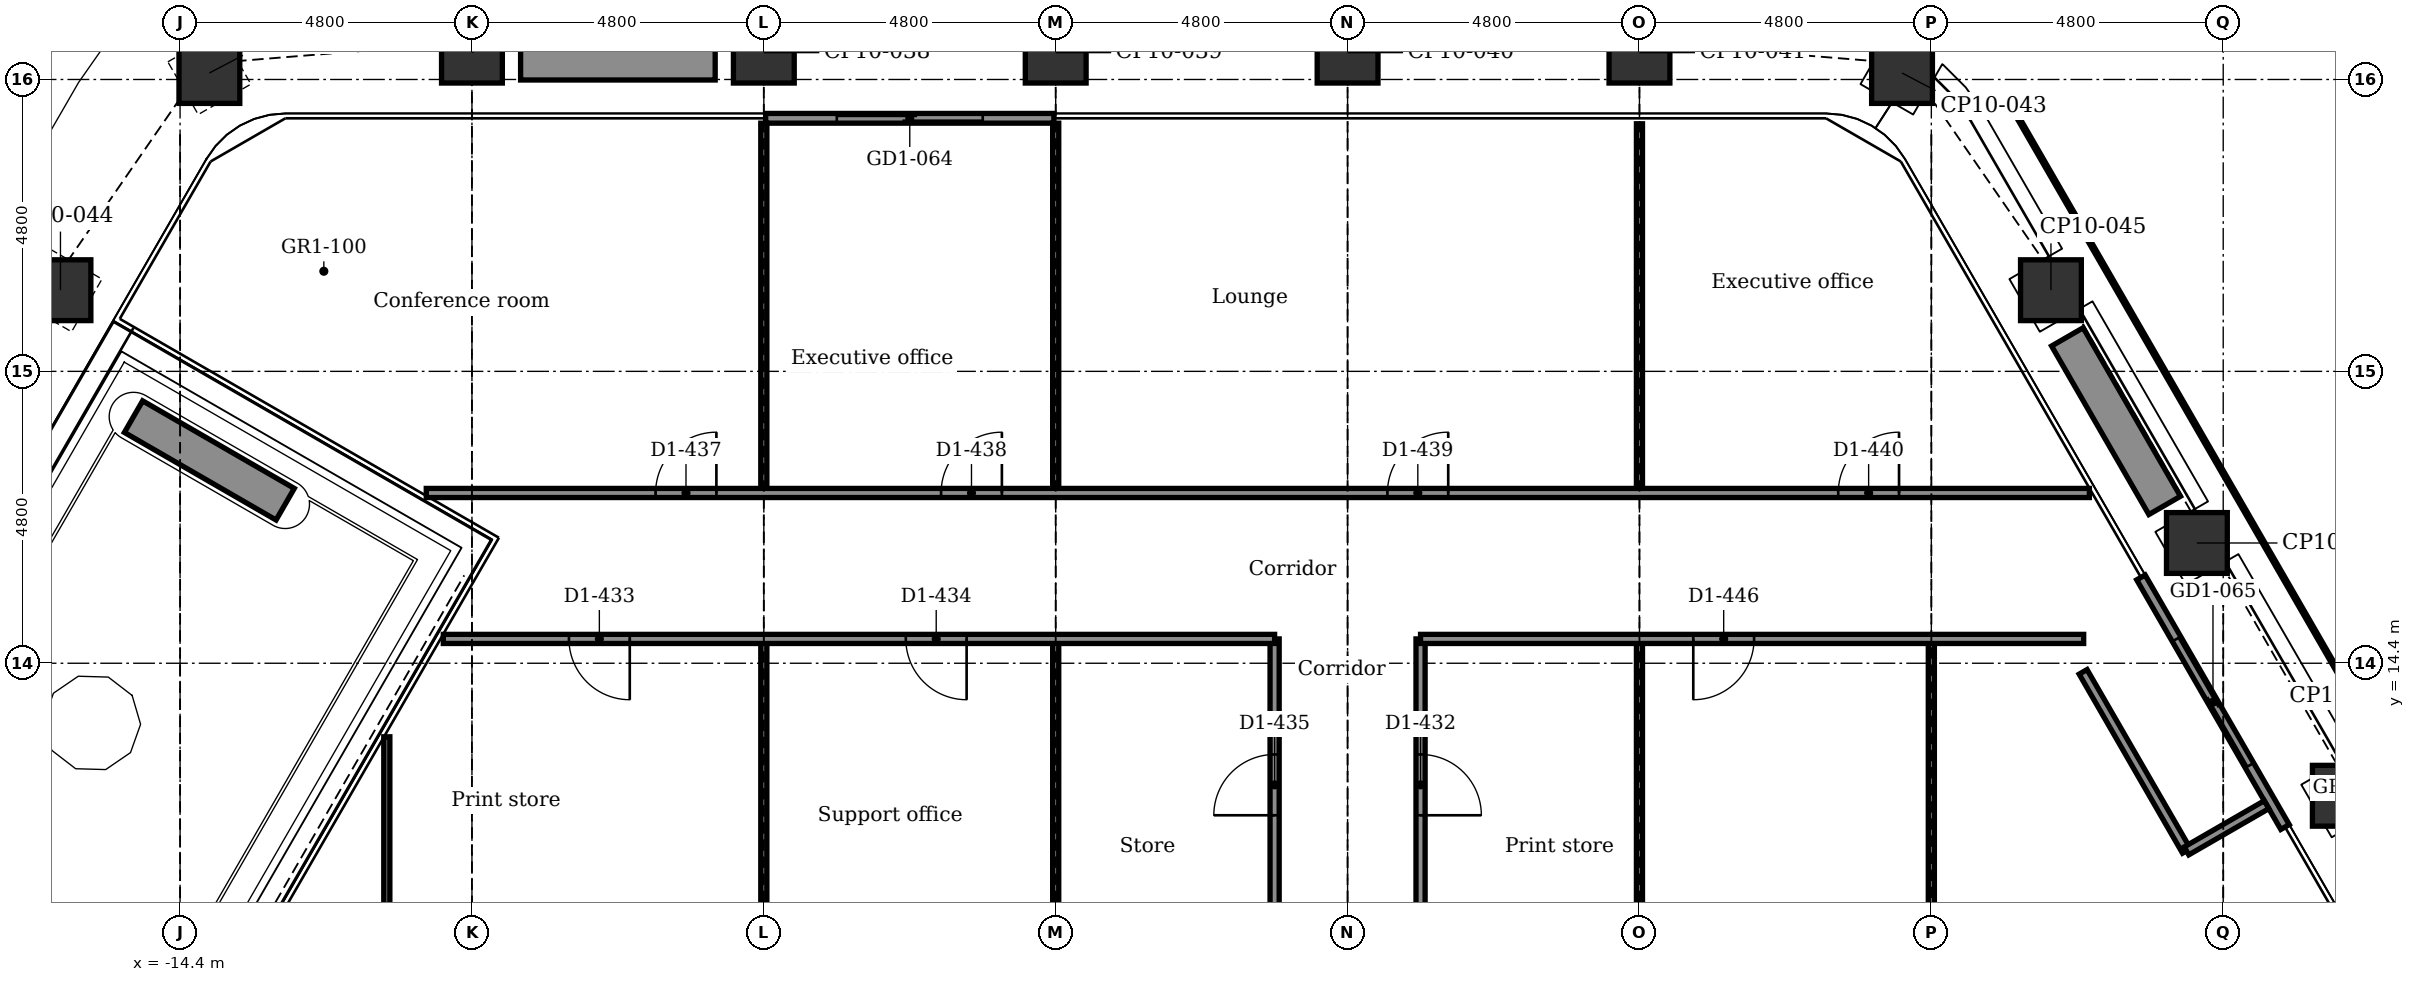
"""IFC4 building model, lengths in metres.
Left out: names, types, materials, properties, quantities, classifications, styles, units other than length and angle.
Written with IfcOpenShell. Run it as: python <this file> out.ifc"""

import sys

from ifc_helpers import new_model, si_unit, direction, frame, frame_2d, origin, origin_2d, place, context, subcontext, project, spatial, rectangle, extrude, element, fill, save


model = new_model("IFC4")
c1 = context("Model", 3, precision=1e-05, world=origin(), true_north=direction((0.0, 1.0)))
c2 = subcontext(c1, "Body", "Model", "MODEL_VIEW")
j1 = project(units=[si_unit("LENGTHUNIT", "METRE"), si_unit("PLANEANGLEUNIT", "RADIAN")], contexts=[c1])
p1 = place(None, origin())
s1 = spatial("IfcSite", under=j1, at=p1, CompositionType="ELEMENT")
p2 = place(p1, origin())
s2 = spatial("IfcBuilding", under=s1, at=p2, CompositionType="ELEMENT")
p3 = place(p2, frame((0.0, 0.0, 150.5)))
s3 = spatial("IfcBuildingStorey", under=s2, at=p3, CompositionType="ELEMENT", Elevation=150.5)
for number, where, z_axis, x_axis in (
    (1, (-13.918, 24.107, -0.15), (0.0, 0.0, 1.0), (0.866, 0.5, 0.0)),
    (2, (-9.6, 24.442, -0.15), (0.0, 0.0, 1.0), (1.0, 0.0, 0.0)),
    (3, (-4.8, 24.442, -0.15), (0.0, 0.0, 1.0), (1.0, 0.0, 0.0)),
    (4, (0.0, 24.442, -0.15), (0.0, 0.0, 1.0), (1.0, 0.0, 0.0)),
    (5, (4.8, 24.442, -0.15), (0.0, 0.0, 1.0), (1.0, 0.0, 0.0)),
    (6, (9.6, 24.442, -0.15), (0.0, 0.0, 1.0), (1.0, 0.0, 0.0)),
    (7, (13.918, 24.107, -0.15), (0.0, 0.0, 1.0), (0.5, 0.866, 0.0)),
    (8, (16.367, 20.535, -0.15), (0.0, 0.0, 1.0), (0.866, 0.5, 0.0)),
    (9, (18.767, 16.378, -0.15), (0.0, 0.0, 1.0), (0.866, 0.5, 0.0)),
    (10, (21.167, 12.221, -0.15), (0.0, 0.0, 1.0), (0.866, 0.5, 0.0)),
    (11, (-16.367, 20.535, -0.15), (0.0, 0.0, 1.0), (0.5, 0.866, 0.0)),
):
    element("IfcColumn", number, at=place(p3, frame(where, z_axis=z_axis, x_axis=x_axis)), inside=s3, PredefinedType="COLUMN", context=c2, shape_type="SweptSolid", body=[
        extrude(rectangle(XDim=1.0, YDim=1.0, at=origin_2d()), origin(), (0.0, 0.0, 1.0), 3.9),
    ])
p4 = place(p3, frame((-4.77, 23.362, 0.0), z_axis=(0.0, 0.0, 1.0), x_axis=(1.0, 0.0, 0.0)))
e12 = element("IfcWall", 12, at=p4, inside=s3, PredefinedType="PARTITIONING", context=c2, shape_type="SweptSolid", body=[
    extrude(rectangle(XDim=4.74, YDim=0.16, at=frame_2d((2.37, 0.0))), origin(), (0.0, 0.0, 1.0), 3.75),
])
p5 = place(p4, frame((1.17, 0.0, 0.0)))
e13 = element("IfcOpeningElement", 13, at=p5, cuts=e12, PredefinedType="OPENING", context=c2, shape_type="SweptSolid", body=[
    extrude(rectangle(XDim=2.4, YDim=2.4, at=frame_2d((1.2, 1.2))), frame((0.0, 0.09, 0.0), z_axis=(0.0, -1.0, 0.0), x_axis=(1.0, 0.0, 0.0)), (0.0, 0.0, 1.0), 0.18),
])
p6 = place(p3, frame((17.847, 15.812, 0.0), z_axis=(0.0, 0.0, 1.0), x_axis=(0.5000167099, -0.866015756104, 0.0)))
e14 = element("IfcWall", 14, at=p6, inside=s3, PredefinedType="PARTITIONING", context=c2, shape_type="SweptSolid", body=[
    extrude(rectangle(XDim=4.74, YDim=0.16, at=frame_2d((2.37, 0.0))), origin(), (0.0, 0.0, 1.0), 3.75),
])
p7 = place(p6, frame((1.17, 0.0, 0.0)))
e15 = element("IfcOpeningElement", 15, at=p7, cuts=e14, PredefinedType="OPENING", context=c2, shape_type="SweptSolid", body=[
    extrude(rectangle(XDim=2.4, YDim=2.4, at=frame_2d((1.2, 1.2))), frame((0.0, 0.09, 0.0), z_axis=(0.0, -1.0, 0.0), x_axis=(1.0, 0.0, 0.0)), (0.0, 0.0, 1.0), 0.18),
])
for number, where, z_axis, x_axis in (
    (16, (-8.8, 24.292, 0.0), (0.0, 0.0, 1.0), (1.0, 0.0, 0.0)),
    (17, (16.637, 19.767, 0.0), (0.0, 0.0, 1.0), (0.5, -0.866, 0.0)),
):
    element("IfcWall", number, at=place(p3, frame(where, z_axis=z_axis, x_axis=x_axis)), inside=s3, PredefinedType="USERDEFINED", context=c2, shape_type="SweptSolid", body=[
        extrude(rectangle(XDim=3.2, YDim=0.6, at=frame_2d((1.6, 0.0))), origin(), (0.0, 0.0, 1.0), 0.7),
    ])
p8 = place(p3, frame((-12.671, 17.015, 0.0), z_axis=(0.0, 0.0, 1.0), x_axis=(-0.866054314686, 0.499949921505, 0.0)))
e18 = element("IfcWall", 18, at=p8, inside=s3, PredefinedType="USERDEFINED", context=c2, shape_type="SweptSolid", body=[
    extrude(rectangle(XDim=2.88, YDim=0.6, at=frame_2d((1.44, 0.0))), origin(), (0.0, 0.0, 1.0), 0.7),
])
p9 = place(p3, frame((14.4, 9.694, 0.0), z_axis=(0.0, 0.0, 1.0), x_axis=(0.0, 1.0, 0.0)))
e19 = element("IfcWall", 19, at=p9, inside=s3, PredefinedType="PARTITIONING", context=c2, shape_type="SweptSolid", body=[
    extrude(rectangle(XDim=5.106, YDim=0.1, at=frame_2d((2.553, 0.0))), origin(), (0.0, 0.0, 1.0), 3.066),
])
p10 = place(p3, frame((9.6, 9.95, 0.0), z_axis=(0.0, 0.0, 1.0), x_axis=(0.0, 1.0, 0.0)))
e20 = element("IfcWall", 20, at=p10, inside=s3, PredefinedType="PARTITIONING", context=c2, shape_type="SweptSolid", body=[
    extrude(rectangle(XDim=4.85, YDim=0.1, at=frame_2d((2.425, 0.0))), origin(), (0.0, 0.0, 1.0), 3.066),
])
p11 = place(p3, frame((9.6, 17.2, 0.0), z_axis=(0.0, 0.0, 1.0), x_axis=(0.0, 1.0, 0.0)))
e21 = element("IfcWall", 21, at=p11, inside=s3, PredefinedType="PARTITIONING", context=c2, shape_type="SweptSolid", body=[
    extrude(rectangle(XDim=6.072, YDim=0.1, at=frame_2d((3.036, 0.0))), origin(), (0.0, 0.0, 1.0), 3.066),
])
p12 = place(p3, frame((6.0, 9.95, 0.0), z_axis=(0.0, 0.0, 1.0), x_axis=(0.0, 1.0, 0.0)))
e22 = element("IfcWall", 22, at=p12, inside=s3, PredefinedType="PARTITIONING", context=c2, shape_type="SweptSolid", body=[
    extrude(rectangle(XDim=4.85, YDim=0.15, at=frame_2d((2.425, 0.0))), origin(), (0.0, 0.0, 1.0), 3.75),
])
p13 = place(p12, frame((1.95, 0.0, 0.0)))
e23 = element("IfcOpeningElement", 23, at=p13, cuts=e22, PredefinedType="OPENING", context=c2, shape_type="SweptSolid", body=[
    extrude(rectangle(XDim=1.0, YDim=2.1, at=frame_2d((0.5, 1.05))), frame((0.0, 0.085, 0.0), z_axis=(0.0, -1.0, 0.0), x_axis=(1.0, 0.0, 0.0)), (0.0, 0.0, 1.0), 0.17),
])
p14 = place(p3, frame((3.6, 9.95, 0.0), z_axis=(0.0, 0.0, 1.0), x_axis=(0.0, 1.0, 0.0)))
e24 = element("IfcWall", 24, at=p14, inside=s3, PredefinedType="PARTITIONING", context=c2, shape_type="SweptSolid", body=[
    extrude(rectangle(XDim=4.85, YDim=0.15, at=frame_2d((2.425, 0.0))), origin(), (0.0, 0.0, 1.0), 3.75),
])
p15 = place(p14, frame((1.95, 0.0, 0.0)))
e25 = element("IfcOpeningElement", 25, at=p15, cuts=e24, PredefinedType="OPENING", context=c2, shape_type="SweptSolid", body=[
    extrude(rectangle(XDim=1.0, YDim=2.1, at=frame_2d((0.5, 1.05))), frame((0.0, 0.085, 0.0), z_axis=(0.0, -1.0, 0.0), x_axis=(1.0, 0.0, 0.0)), (0.0, 0.0, 1.0), 0.17),
])
p16 = place(p3, frame((0.0, 9.95, 0.0), z_axis=(0.0, 0.0, 1.0), x_axis=(0.0, 1.0, 0.0)))
e26 = element("IfcWall", 26, at=p16, inside=s3, PredefinedType="PARTITIONING", context=c2, shape_type="SweptSolid", body=[
    extrude(rectangle(XDim=4.85, YDim=0.1, at=frame_2d((2.425, 0.0))), origin(), (0.0, 0.0, 1.0), 3.066),
])
p17 = place(p3, frame((0.0, 17.2, 0.0), z_axis=(0.0, 0.0, 1.0), x_axis=(0.0, 1.0, 0.0)))
e27 = element("IfcWall", 27, at=p17, inside=s3, PredefinedType="PARTITIONING", context=c2, shape_type="SweptSolid", body=[
    extrude(rectangle(XDim=6.082, YDim=0.1, at=frame_2d((3.041, 0.0))), origin(), (0.0, 0.0, 1.0), 3.066),
])
p18 = place(p3, frame((-4.8, 9.95, 0.0), z_axis=(0.0, 0.0, 1.0), x_axis=(0.0, 1.0, 0.0)))
e28 = element("IfcWall", 28, at=p18, inside=s3, PredefinedType="PARTITIONING", context=c2, shape_type="SweptSolid", body=[
    extrude(rectangle(XDim=4.85, YDim=0.1, at=frame_2d((2.425, 0.0))), origin(), (0.0, 0.0, 1.0), 3.066),
])
p19 = place(p3, frame((-4.8, 17.2, 0.0), z_axis=(0.0, 0.0, 1.0), x_axis=(0.0, 1.0, 0.0)))
e29 = element("IfcWall", 29, at=p19, inside=s3, PredefinedType="PARTITIONING", context=c2, shape_type="SweptSolid", body=[
    extrude(rectangle(XDim=6.082, YDim=0.1, at=frame_2d((3.041, 0.0))), origin(), (0.0, 0.0, 1.0), 3.066),
])
p20 = place(p3, frame((-11.0, 10.0, 0.0), z_axis=(0.0, 0.0, 1.0), x_axis=(0.0, 1.0, 0.0)))
e30 = element("IfcWall", 30, at=p20, inside=s3, PredefinedType="PARTITIONING", context=c2, shape_type="SweptSolid", body=[
    extrude(rectangle(XDim=3.19, YDim=0.1, at=frame_2d((1.595, 0.0))), origin(), (0.0, 0.0, 1.0), 3.75),
])
p21 = place(p3, frame((16.896, 14.258, 0.0), z_axis=(0.0, 0.0, 1.0), x_axis=(0.499977295307, -0.866038511948, 0.0)))
e31 = element("IfcWall", 31, at=p21, inside=s3, PredefinedType="PARTITIONING", context=c2, shape_type="SweptSolid", body=[
    extrude(rectangle(XDim=3.4, YDim=0.15, at=frame_2d((1.7, 0.0))), origin(), (0.0, 0.0, 1.0), 3.75),
])
p22 = place(p3, frame((18.596, 11.314, 0.0), z_axis=(0.0, 0.0, 1.0), x_axis=(0.866030456496, 0.499991248344, 0.0)))
e32 = element("IfcWall", 32, at=p22, inside=s3, PredefinedType="PARTITIONING", context=c2, shape_type="SweptSolid", body=[
    extrude(rectangle(XDim=1.52, YDim=0.15, at=frame_2d((0.76, 0.0))), origin(), (0.0, 0.0, 1.0), 3.75),
])
p23 = place(p3, frame((-10.071, 14.8, 0.0), z_axis=(0.0, 0.0, 1.0), x_axis=(1.0, 0.0, 0.0)))
e33 = element("IfcWall", 33, at=p23, inside=s3, PredefinedType="PARTITIONING", context=c2, shape_type="SweptSolid", body=[
    extrude(rectangle(XDim=13.671, YDim=0.15, at=frame_2d((6.835, 0.0))), origin(), (0.0, 0.0, 1.0), 3.75),
])
p24 = place(p23, frame((2.066, 0.0, 0.0)))
e34 = element("IfcOpeningElement", 34, at=p24, cuts=e33, PredefinedType="OPENING", context=c2, shape_type="SweptSolid", body=[
    extrude(rectangle(XDim=1.0, YDim=2.1, at=frame_2d((0.5, 1.05))), frame((0.0, 0.085, 0.0), z_axis=(0.0, -1.0, 0.0), x_axis=(1.0, 0.0, 0.0)), (0.0, 0.0, 1.0), 0.17),
])
p25 = place(p23, frame((7.606, 0.0, 0.0)))
e35 = element("IfcOpeningElement", 35, at=p25, cuts=e33, PredefinedType="OPENING", context=c2, shape_type="SweptSolid", body=[
    extrude(rectangle(XDim=1.0, YDim=2.1, at=frame_2d((0.5, 1.05))), frame((0.0, 0.085, 0.0), z_axis=(0.0, -1.0, 0.0), x_axis=(1.0, 0.0, 0.0)), (0.0, 0.0, 1.0), 0.17),
])
p26 = place(p3, frame((6.0, 14.8, 0.0), z_axis=(0.0, 0.0, 1.0), x_axis=(1.0, 0.0, 0.0)))
e36 = element("IfcWall", 36, at=p26, inside=s3, PredefinedType="PARTITIONING", context=c2, shape_type="SweptSolid", body=[
    extrude(rectangle(XDim=10.905, YDim=0.15, at=frame_2d((5.453, 0.0))), origin(), (0.0, 0.0, 1.0), 3.75),
])
p27 = place(p26, frame((4.485, 0.0, 0.0)))
e37 = element("IfcOpeningElement", 37, at=p27, cuts=e36, PredefinedType="OPENING", context=c2, shape_type="SweptSolid", body=[
    extrude(rectangle(XDim=1.0, YDim=2.1, at=frame_2d((0.5, 1.05))), frame((0.0, 0.085, 0.0), z_axis=(0.0, -1.0, 0.0), x_axis=(1.0, 0.0, 0.0)), (0.0, 0.0, 1.0), 0.17),
])
p28 = place(p3, frame((-10.351, 17.2, 0.0), z_axis=(0.0, 0.0, 1.0), x_axis=(1.0, 0.0, 0.0)))
e38 = element("IfcWall", 38, at=p28, inside=s3, PredefinedType="PARTITIONING", context=c2, shape_type="SweptSolid", body=[
    extrude(rectangle(XDim=27.35, YDim=0.15, at=frame_2d((13.675, 0.0))), origin(), (0.0, 0.0, 1.0), 3.75),
])
p29 = place(p28, frame((3.771, 0.0, 0.0)))
e39 = element("IfcOpeningElement", 39, at=p29, cuts=e38, PredefinedType="OPENING", context=c2, shape_type="SweptSolid", body=[
    extrude(rectangle(XDim=1.0, YDim=2.1, at=frame_2d((0.5, 1.05))), frame((0.0, 0.085, 0.0), z_axis=(0.0, -1.0, 0.0), x_axis=(1.0, 0.0, 0.0)), (0.0, 0.0, 1.0), 0.17),
])
p30 = place(p28, frame((8.466, 0.0, 0.0)))
e40 = element("IfcOpeningElement", 40, at=p30, cuts=e38, PredefinedType="OPENING", context=c2, shape_type="SweptSolid", body=[
    extrude(rectangle(XDim=1.0, YDim=2.1, at=frame_2d((0.5, 1.05))), frame((0.0, 0.085, 0.0), z_axis=(0.0, -1.0, 0.0), x_axis=(1.0, 0.0, 0.0)), (0.0, 0.0, 1.0), 0.17),
])
p31 = place(p28, frame((15.806, 0.0, 0.0)))
e41 = element("IfcOpeningElement", 41, at=p31, cuts=e38, PredefinedType="OPENING", context=c2, shape_type="SweptSolid", body=[
    extrude(rectangle(XDim=1.0, YDim=2.1, at=frame_2d((0.5, 1.05))), frame((0.0, 0.085, 0.0), z_axis=(0.0, -1.0, 0.0), x_axis=(1.0, 0.0, 0.0)), (0.0, 0.0, 1.0), 0.17),
])
p32 = place(p28, frame((23.22, 0.0, 0.0)))
e42 = element("IfcOpeningElement", 42, at=p32, cuts=e38, PredefinedType="OPENING", context=c2, shape_type="SweptSolid", body=[
    extrude(rectangle(XDim=1.0, YDim=2.1, at=frame_2d((0.5, 1.05))), frame((0.0, 0.085, 0.0), z_axis=(0.0, -1.0, 0.0), x_axis=(1.0, 0.0, 0.0)), (0.0, 0.0, 1.0), 0.17),
])
p33 = place(p5, origin())
e43 = element("IfcDoor", 43, at=p33, inside=s3, OperationType="DOUBLE_DOOR_SLIDING", PredefinedType="DOOR", context=c2, shape_type="SweptSolid", body=[
    extrude(rectangle(XDim=2.4, YDim=2.4, at=frame_2d((1.2, 1.2))), frame((0.0, 0.025, 0.0), z_axis=(0.0, -1.0, 0.0), x_axis=(1.0, 0.0, 0.0)), (0.0, 0.0, 1.0), 0.05),
])
fill(e13, e43)
p34 = place(p7, origin())
e44 = element("IfcDoor", 44, at=p34, inside=s3, OperationType="DOUBLE_DOOR_SLIDING", PredefinedType="DOOR", context=c2, shape_type="SweptSolid", body=[
    extrude(rectangle(XDim=2.4, YDim=2.4, at=frame_2d((1.2, 1.2))), frame((0.0, 0.025, 0.0), z_axis=(0.0, -1.0, 0.0), x_axis=(1.0, 0.0, 0.0)), (0.0, 0.0, 1.0), 0.05),
])
fill(e15, e44)
p35 = place(p13, frame((1.0, 0.0, 0.0), z_axis=(0.0, 0.0, 1.0), x_axis=(-1.0, 0.0, 0.0)))
e45 = element("IfcDoor", 45, at=p35, inside=s3, OperationType="SINGLE_SWING_LEFT", PredefinedType="DOOR", context=c2, shape_type="SweptSolid", body=[
    extrude(rectangle(XDim=1.0, YDim=2.1, at=frame_2d((0.5, 1.05))), frame((0.0, 0.025, 0.0), z_axis=(0.0, -1.0, 0.0), x_axis=(1.0, 0.0, 0.0)), (0.0, 0.0, 1.0), 0.05),
])
fill(e23, e45)
p36 = place(p24, frame((1.0, 0.0, 0.0), z_axis=(0.0, 0.0, 1.0), x_axis=(-1.0, 0.0, 0.0)))
e46 = element("IfcDoor", 46, at=p36, inside=s3, OperationType="SINGLE_SWING_RIGHT", PredefinedType="DOOR", context=c2, shape_type="SweptSolid", body=[
    extrude(rectangle(XDim=1.0, YDim=2.1, at=frame_2d((0.5, 1.05))), frame((0.0, 0.025, 0.0), z_axis=(0.0, -1.0, 0.0), x_axis=(1.0, 0.0, 0.0)), (0.0, 0.0, 1.0), 0.05),
])
fill(e34, e46)
p37 = place(p25, frame((1.0, 0.0, 0.0), z_axis=(0.0, 0.0, 1.0), x_axis=(-1.0, 0.0, 0.0)))
e47 = element("IfcDoor", 47, at=p37, inside=s3, OperationType="SINGLE_SWING_RIGHT", PredefinedType="DOOR", context=c2, shape_type="SweptSolid", body=[
    extrude(rectangle(XDim=1.0, YDim=2.1, at=frame_2d((0.5, 1.05))), frame((0.0, 0.025, 0.0), z_axis=(0.0, -1.0, 0.0), x_axis=(1.0, 0.0, 0.0)), (0.0, 0.0, 1.0), 0.05),
])
fill(e35, e47)
p38 = place(p15, origin())
e48 = element("IfcDoor", 48, at=p38, inside=s3, OperationType="SINGLE_SWING_LEFT", PredefinedType="DOOR", context=c2, shape_type="SweptSolid", body=[
    extrude(rectangle(XDim=1.0, YDim=2.1, at=frame_2d((0.5, 1.05))), frame((0.0, 0.025, 0.0), z_axis=(0.0, -1.0, 0.0), x_axis=(1.0, 0.0, 0.0)), (0.0, 0.0, 1.0), 0.05),
])
fill(e25, e48)
p39 = place(p29, origin())
e49 = element("IfcDoor", 49, at=p39, inside=s3, OperationType="SINGLE_SWING_RIGHT", PredefinedType="DOOR", context=c2, shape_type="SweptSolid", body=[
    extrude(rectangle(XDim=1.0, YDim=2.1, at=frame_2d((0.5, 1.05))), frame((0.0, 0.025, 0.0), z_axis=(0.0, -1.0, 0.0), x_axis=(1.0, 0.0, 0.0)), (0.0, 0.0, 1.0), 0.05),
])
fill(e39, e49)
p40 = place(p30, origin())
e50 = element("IfcDoor", 50, at=p40, inside=s3, OperationType="SINGLE_SWING_RIGHT", PredefinedType="DOOR", context=c2, shape_type="SweptSolid", body=[
    extrude(rectangle(XDim=1.0, YDim=2.1, at=frame_2d((0.5, 1.05))), frame((0.0, 0.025, 0.0), z_axis=(0.0, -1.0, 0.0), x_axis=(1.0, 0.0, 0.0)), (0.0, 0.0, 1.0), 0.05),
])
fill(e40, e50)
p41 = place(p31, origin())
e51 = element("IfcDoor", 51, at=p41, inside=s3, OperationType="SINGLE_SWING_RIGHT", PredefinedType="DOOR", context=c2, shape_type="SweptSolid", body=[
    extrude(rectangle(XDim=1.0, YDim=2.1, at=frame_2d((0.5, 1.05))), frame((0.0, 0.025, 0.0), z_axis=(0.0, -1.0, 0.0), x_axis=(1.0, 0.0, 0.0)), (0.0, 0.0, 1.0), 0.05),
])
fill(e41, e51)
p42 = place(p32, origin())
e52 = element("IfcDoor", 52, at=p42, inside=s3, OperationType="SINGLE_SWING_RIGHT", PredefinedType="DOOR", context=c2, shape_type="SweptSolid", body=[
    extrude(rectangle(XDim=1.0, YDim=2.1, at=frame_2d((0.5, 1.05))), frame((0.0, 0.025, 0.0), z_axis=(0.0, -1.0, 0.0), x_axis=(1.0, 0.0, 0.0)), (0.0, 0.0, 1.0), 0.05),
])
fill(e42, e52)
p43 = place(p27, frame((1.0, 0.0, 0.0), z_axis=(0.0, 0.0, 1.0), x_axis=(-1.0, 0.0, 0.0)))
e53 = element("IfcDoor", 53, at=p43, inside=s3, OperationType="SINGLE_SWING_LEFT", PredefinedType="DOOR", context=c2, shape_type="SweptSolid", body=[
    extrude(rectangle(XDim=1.0, YDim=2.1, at=frame_2d((0.5, 1.05))), frame((0.0, 0.025, 0.0), z_axis=(0.0, -1.0, 0.0), x_axis=(1.0, 0.0, 0.0)), (0.0, 0.0, 1.0), 0.05),
])
fill(e37, e53)
save(model, sys.argv[1])
